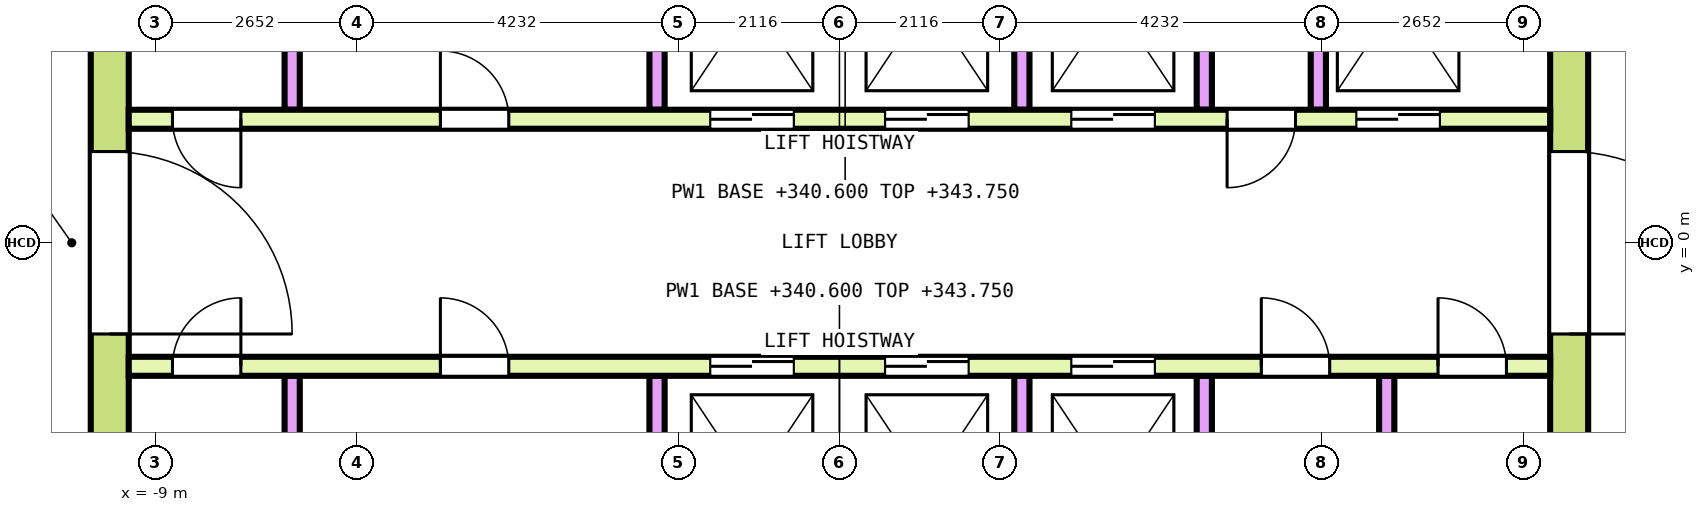
"""IFC4 building model, lengths in metres.
Left out: names, types, materials, properties, quantities, classifications, styles, units other than length and angle.
Written with IfcOpenShell. Run it as: python <this file> out.ifc"""

import sys

from ifc_helpers import new_model, si_unit, direction, frame, frame_2d, origin, place, context, subcontext, project, spatial, rectangle, extrude, element, fill, save


model = new_model("IFC4")
c1 = context("Model", 3, precision=1e-05, world=origin(), true_north=direction((0.0, 1.0)))
c2 = subcontext(c1, "Body", "Model", "MODEL_VIEW")
j1 = project(units=[si_unit("LENGTHUNIT", "METRE"), si_unit("PLANEANGLEUNIT", "RADIAN")], contexts=[c1])
p1 = place(None, origin())
s1 = spatial("IfcSite", under=j1, at=p1, CompositionType="ELEMENT")
p2 = place(p1, origin())
s2 = spatial("IfcBuilding", under=s1, at=p2, CompositionType="ELEMENT")
p3 = place(p2, frame((0.0, 0.0, 340.6)))
s3 = spatial("IfcBuildingStorey", under=s2, at=p3, CompositionType="ELEMENT", Elevation=340.6)
p4 = place(p3, frame((-9.6, -7.85, 0.0), z_axis=(0.0, 0.0, 1.0), x_axis=(0.0, 1.0, 0.0)))
e1 = element("IfcWall", 1, at=p4, inside=s3, PredefinedType="SHEAR", context=c2, shape_type="SweptSolid", body=[
    extrude(rectangle(XDim=15.7, YDim=0.5, at=frame_2d((7.85, 0.0))), origin(), (0.0, 0.0, 1.0), 3.8),
])
p5 = place(p4, frame((6.65, 0.0, 0.0)))
e2 = element("IfcOpeningElement", 2, at=p5, cuts=e1, PredefinedType="OPENING", context=c2, shape_type="SweptSolid", body=[
    extrude(rectangle(XDim=2.4, YDim=2.1, at=frame_2d((1.2, 1.05))), frame((0.0, 0.26, 0.0), z_axis=(0.0, -1.0, 0.0), x_axis=(1.0, 0.0, 0.0)), (0.0, 0.0, 1.0), 0.52),
])
p6 = place(p4, frame((13.55, 0.0, 0.0)))
e3 = element("IfcOpeningElement", 3, at=p6, cuts=e1, PredefinedType="OPENING", context=c2, shape_type="SweptSolid", body=[
    extrude(rectangle(XDim=1.2, YDim=2.1, at=frame_2d((0.6, 1.05))), frame((0.0, 0.26, 0.0), z_axis=(0.0, -1.0, 0.0), x_axis=(1.0, 0.0, 0.0)), (0.0, 0.0, 1.0), 0.52),
])
p7 = place(p4, frame((0.95, 0.0, 0.0)))
e4 = element("IfcOpeningElement", 4, at=p7, cuts=e1, PredefinedType="OPENING", context=c2, shape_type="SweptSolid", body=[
    extrude(rectangle(XDim=1.2, YDim=2.1, at=frame_2d((0.6, 1.05))), frame((0.0, 0.26, 0.0), z_axis=(0.0, -1.0, 0.0), x_axis=(1.0, 0.0, 0.0)), (0.0, 0.0, 1.0), 0.52),
])
p8 = place(p3, frame((9.6, -7.85, 0.0), z_axis=(0.0, 0.0, 1.0), x_axis=(0.0, 1.0, 0.0)))
e5 = element("IfcWall", 5, at=p8, inside=s3, PredefinedType="SHEAR", context=c2, shape_type="SweptSolid", body=[
    extrude(rectangle(XDim=15.7, YDim=0.5, at=frame_2d((7.85, 0.0))), origin(), (0.0, 0.0, 1.0), 3.8),
])
p9 = place(p8, frame((6.65, 0.0, 0.0)))
e6 = element("IfcOpeningElement", 6, at=p9, cuts=e5, PredefinedType="OPENING", context=c2, shape_type="SweptSolid", body=[
    extrude(rectangle(XDim=2.4, YDim=2.1, at=frame_2d((1.2, 1.05))), frame((0.0, 0.26, 0.0), z_axis=(0.0, -1.0, 0.0), x_axis=(1.0, 0.0, 0.0)), (0.0, 0.0, 1.0), 0.52),
])
p10 = place(p8, frame((13.55, 0.0, 0.0)))
e7 = element("IfcOpeningElement", 7, at=p10, cuts=e5, PredefinedType="OPENING", context=c2, shape_type="SweptSolid", body=[
    extrude(rectangle(XDim=1.2, YDim=2.1, at=frame_2d((0.6, 1.05))), frame((0.0, 0.26, 0.0), z_axis=(0.0, -1.0, 0.0), x_axis=(1.0, 0.0, 0.0)), (0.0, 0.0, 1.0), 0.52),
])
p11 = place(p8, frame((1.05, 0.0, 0.0)))
e8 = element("IfcOpeningElement", 8, at=p11, cuts=e5, PredefinedType="OPENING", context=c2, shape_type="SweptSolid", body=[
    extrude(rectangle(XDim=1.0, YDim=2.1, at=frame_2d((0.5, 1.05))), frame((0.0, 0.26, 0.0), z_axis=(0.0, -1.0, 0.0), x_axis=(1.0, 0.0, 0.0)), (0.0, 0.0, 1.0), 0.52),
])
p12 = place(p3, frame((-9.35, 1.625, 0.0), z_axis=(0.0, 0.0, 1.0), x_axis=(1.0, 0.0, 0.0)))
e9 = element("IfcWall", 9, at=p12, inside=s3, PredefinedType="SOLIDWALL", context=c2, shape_type="SweptSolid", body=[
    extrude(rectangle(XDim=18.7, YDim=0.25, at=frame_2d((9.35, 0.0))), origin(), (0.0, 0.0, 1.0), 3.8),
])
p13 = place(p12, frame((7.65, 0.0, 0.0)))
e10 = element("IfcOpeningElement", 10, at=p13, cuts=e9, PredefinedType="OPENING", context=c2, shape_type="SweptSolid", body=[
    extrude(rectangle(XDim=1.1, YDim=2.1, at=frame_2d((0.55, 1.05))), frame((0.0, 0.135, 0.0), z_axis=(0.0, -1.0, 0.0), x_axis=(1.0, 0.0, 0.0)), (0.0, 0.0, 1.0), 0.27),
])
p14 = place(p12, frame((9.95, 0.0, 0.0)))
e11 = element("IfcOpeningElement", 11, at=p14, cuts=e9, PredefinedType="OPENING", context=c2, shape_type="SweptSolid", body=[
    extrude(rectangle(XDim=1.1, YDim=2.1, at=frame_2d((0.55, 1.05))), frame((0.0, 0.135, 0.0), z_axis=(0.0, -1.0, 0.0), x_axis=(1.0, 0.0, 0.0)), (0.0, 0.0, 1.0), 0.27),
])
p15 = place(p12, frame((12.4, 0.0, 0.0)))
e12 = element("IfcOpeningElement", 12, at=p15, cuts=e9, PredefinedType="OPENING", context=c2, shape_type="SweptSolid", body=[
    extrude(rectangle(XDim=1.1, YDim=2.1, at=frame_2d((0.55, 1.05))), frame((0.0, 0.135, 0.0), z_axis=(0.0, -1.0, 0.0), x_axis=(1.0, 0.0, 0.0)), (0.0, 0.0, 1.0), 0.27),
])
p16 = place(p12, frame((16.15, 0.0, 0.0)))
e13 = element("IfcOpeningElement", 13, at=p16, cuts=e9, PredefinedType="OPENING", context=c2, shape_type="SweptSolid", body=[
    extrude(rectangle(XDim=1.1, YDim=2.1, at=frame_2d((0.55, 1.05))), frame((0.0, 0.135, 0.0), z_axis=(0.0, -1.0, 0.0), x_axis=(1.0, 0.0, 0.0)), (0.0, 0.0, 1.0), 0.27),
])
p17 = place(p12, frame((0.575, 0.0, 0.0)))
e14 = element("IfcOpeningElement", 14, at=p17, cuts=e9, PredefinedType="OPENING", context=c2, shape_type="SweptSolid", body=[
    extrude(rectangle(XDim=0.9, YDim=2.1, at=frame_2d((0.45, 1.05))), frame((0.0, 0.135, 0.0), z_axis=(0.0, -1.0, 0.0), x_axis=(1.0, 0.0, 0.0)), (0.0, 0.0, 1.0), 0.27),
])
p18 = place(p12, frame((4.1, 0.0, 0.0)))
e15 = element("IfcOpeningElement", 15, at=p18, cuts=e9, PredefinedType="OPENING", context=c2, shape_type="SweptSolid", body=[
    extrude(rectangle(XDim=0.9, YDim=2.1, at=frame_2d((0.45, 1.05))), frame((0.0, 0.135, 0.0), z_axis=(0.0, -1.0, 0.0), x_axis=(1.0, 0.0, 0.0)), (0.0, 0.0, 1.0), 0.27),
])
p19 = place(p12, frame((14.45, 0.0, 0.0)))
e16 = element("IfcOpeningElement", 16, at=p19, cuts=e9, PredefinedType="OPENING", context=c2, shape_type="SweptSolid", body=[
    extrude(rectangle(XDim=0.9, YDim=2.1, at=frame_2d((0.45, 1.05))), frame((0.0, 0.135, 0.0), z_axis=(0.0, -1.0, 0.0), x_axis=(1.0, 0.0, 0.0)), (0.0, 0.0, 1.0), 0.27),
])
for number, where, z_axis, x_axis in (
    (17, (-7.2, 1.75, 0.0), (0.0, 0.0, 1.0), (0.0, 1.0, 0.0)),
    (18, (-2.4, 1.75, 0.0), (0.0, 0.0, 1.0), (0.0, 1.0, 0.0)),
    (19, (2.4, 1.75, 0.0), (0.0, 0.0, 1.0), (0.0, 1.0, 0.0)),
    (20, (4.8, 1.75, 0.0), (0.0, 0.0, 1.0), (0.0, 1.0, 0.0)),
    (21, (6.3, 1.75, 0.0), (0.0, 0.0, 1.0), (0.0, 1.0, 0.0)),
):
    element("IfcWall", number, at=place(p3, frame(where, z_axis=z_axis, x_axis=x_axis)), inside=s3, PredefinedType="SOLIDWALL", context=c2, shape_type="SweptSolid", body=[
        extrude(rectangle(XDim=2.9, YDim=0.2, at=frame_2d((1.45, 0.0))), origin(), (0.0, 0.0, 1.0), 3.8),
    ])
p20 = place(p3, frame((-9.35, -1.625, 0.0), z_axis=(0.0, 0.0, 1.0), x_axis=(1.0, 0.0, 0.0)))
e22 = element("IfcWall", 22, at=p20, inside=s3, PredefinedType="SOLIDWALL", context=c2, shape_type="SweptSolid", body=[
    extrude(rectangle(XDim=18.7, YDim=0.25, at=frame_2d((9.35, 0.0))), origin(), (0.0, 0.0, 1.0), 3.8),
])
p21 = place(p20, frame((7.65, 0.0, 0.0)))
e23 = element("IfcOpeningElement", 23, at=p21, cuts=e22, PredefinedType="OPENING", context=c2, shape_type="SweptSolid", body=[
    extrude(rectangle(XDim=1.1, YDim=2.1, at=frame_2d((0.55, 1.05))), frame((0.0, 0.135, 0.0), z_axis=(0.0, -1.0, 0.0), x_axis=(1.0, 0.0, 0.0)), (0.0, 0.0, 1.0), 0.27),
])
p22 = place(p20, frame((9.95, 0.0, 0.0)))
e24 = element("IfcOpeningElement", 24, at=p22, cuts=e22, PredefinedType="OPENING", context=c2, shape_type="SweptSolid", body=[
    extrude(rectangle(XDim=1.1, YDim=2.1, at=frame_2d((0.55, 1.05))), frame((0.0, 0.135, 0.0), z_axis=(0.0, -1.0, 0.0), x_axis=(1.0, 0.0, 0.0)), (0.0, 0.0, 1.0), 0.27),
])
p23 = place(p20, frame((12.4, 0.0, 0.0)))
e25 = element("IfcOpeningElement", 25, at=p23, cuts=e22, PredefinedType="OPENING", context=c2, shape_type="SweptSolid", body=[
    extrude(rectangle(XDim=1.1, YDim=2.1, at=frame_2d((0.55, 1.05))), frame((0.0, 0.135, 0.0), z_axis=(0.0, -1.0, 0.0), x_axis=(1.0, 0.0, 0.0)), (0.0, 0.0, 1.0), 0.27),
])
p24 = place(p20, frame((0.575, 0.0, 0.0)))
e26 = element("IfcOpeningElement", 26, at=p24, cuts=e22, PredefinedType="OPENING", context=c2, shape_type="SweptSolid", body=[
    extrude(rectangle(XDim=0.9, YDim=2.1, at=frame_2d((0.45, 1.05))), frame((0.0, 0.135, 0.0), z_axis=(0.0, -1.0, 0.0), x_axis=(1.0, 0.0, 0.0)), (0.0, 0.0, 1.0), 0.27),
])
p25 = place(p20, frame((4.1, 0.0, 0.0)))
e27 = element("IfcOpeningElement", 27, at=p25, cuts=e22, PredefinedType="OPENING", context=c2, shape_type="SweptSolid", body=[
    extrude(rectangle(XDim=0.9, YDim=2.1, at=frame_2d((0.45, 1.05))), frame((0.0, 0.135, 0.0), z_axis=(0.0, -1.0, 0.0), x_axis=(1.0, 0.0, 0.0)), (0.0, 0.0, 1.0), 0.27),
])
p26 = place(p20, frame((14.9, 0.0, 0.0)))
e28 = element("IfcOpeningElement", 28, at=p26, cuts=e22, PredefinedType="OPENING", context=c2, shape_type="SweptSolid", body=[
    extrude(rectangle(XDim=0.9, YDim=2.1, at=frame_2d((0.45, 1.05))), frame((0.0, 0.135, 0.0), z_axis=(0.0, -1.0, 0.0), x_axis=(1.0, 0.0, 0.0)), (0.0, 0.0, 1.0), 0.27),
])
p27 = place(p20, frame((17.225, 0.0, 0.0)))
e29 = element("IfcOpeningElement", 29, at=p27, cuts=e22, PredefinedType="OPENING", context=c2, shape_type="SweptSolid", body=[
    extrude(rectangle(XDim=0.9, YDim=2.1, at=frame_2d((0.45, 1.05))), frame((0.0, 0.135, 0.0), z_axis=(0.0, -1.0, 0.0), x_axis=(1.0, 0.0, 0.0)), (0.0, 0.0, 1.0), 0.27),
])
for number, where, z_axis, x_axis in (
    (30, (-7.2, -4.65, 0.0), (0.0, 0.0, 1.0), (0.0, 1.0, 0.0)),
    (31, (-2.4, -4.65, 0.0), (0.0, 0.0, 1.0), (0.0, 1.0, 0.0)),
    (32, (2.4, -4.65, 0.0), (0.0, 0.0, 1.0), (0.0, 1.0, 0.0)),
    (33, (4.8, -4.65, 0.0), (0.0, 0.0, 1.0), (0.0, 1.0, 0.0)),
    (34, (7.2, -4.65, 0.0), (0.0, 0.0, 1.0), (0.0, 1.0, 0.0)),
):
    element("IfcWall", number, at=place(p3, frame(where, z_axis=z_axis, x_axis=x_axis)), inside=s3, PredefinedType="SOLIDWALL", context=c2, shape_type="SweptSolid", body=[
        extrude(rectangle(XDim=2.9, YDim=0.2, at=frame_2d((1.45, 0.0))), origin(), (0.0, 0.0, 1.0), 3.8),
    ])
p28 = place(p13, origin())
e35 = element("IfcDoor", 35, at=p28, inside=s3, OperationType="DOUBLE_DOOR_SLIDING", PredefinedType="DOOR", context=c2, shape_type="SweptSolid", body=[
    extrude(rectangle(XDim=1.1, YDim=2.1, at=frame_2d((0.55, 1.05))), frame((0.0, 0.075, 0.0), z_axis=(0.0, -1.0, 0.0), x_axis=(1.0, 0.0, 0.0)), (0.0, 0.0, 1.0), 0.15),
])
fill(e10, e35)
p29 = place(p14, origin())
e36 = element("IfcDoor", 36, at=p29, inside=s3, OperationType="DOUBLE_DOOR_SLIDING", PredefinedType="DOOR", context=c2, shape_type="SweptSolid", body=[
    extrude(rectangle(XDim=1.1, YDim=2.1, at=frame_2d((0.55, 1.05))), frame((0.0, 0.075, 0.0), z_axis=(0.0, -1.0, 0.0), x_axis=(1.0, 0.0, 0.0)), (0.0, 0.0, 1.0), 0.15),
])
fill(e11, e36)
p30 = place(p15, origin())
e37 = element("IfcDoor", 37, at=p30, inside=s3, OperationType="DOUBLE_DOOR_SLIDING", PredefinedType="DOOR", context=c2, shape_type="SweptSolid", body=[
    extrude(rectangle(XDim=1.1, YDim=2.1, at=frame_2d((0.55, 1.05))), frame((0.0, 0.075, 0.0), z_axis=(0.0, -1.0, 0.0), x_axis=(1.0, 0.0, 0.0)), (0.0, 0.0, 1.0), 0.15),
])
fill(e12, e37)
p31 = place(p16, origin())
e38 = element("IfcDoor", 38, at=p31, inside=s3, OperationType="DOUBLE_DOOR_SLIDING", PredefinedType="DOOR", context=c2, shape_type="SweptSolid", body=[
    extrude(rectangle(XDim=1.1, YDim=2.1, at=frame_2d((0.55, 1.05))), frame((0.0, 0.075, 0.0), z_axis=(0.0, -1.0, 0.0), x_axis=(1.0, 0.0, 0.0)), (0.0, 0.0, 1.0), 0.15),
])
fill(e13, e38)
p32 = place(p21, origin())
e39 = element("IfcDoor", 39, at=p32, inside=s3, OperationType="DOUBLE_DOOR_SLIDING", PredefinedType="DOOR", context=c2, shape_type="SweptSolid", body=[
    extrude(rectangle(XDim=1.1, YDim=2.1, at=frame_2d((0.55, 1.05))), frame((0.0, 0.075, 0.0), z_axis=(0.0, -1.0, 0.0), x_axis=(1.0, 0.0, 0.0)), (0.0, 0.0, 1.0), 0.15),
])
fill(e23, e39)
p33 = place(p22, origin())
e40 = element("IfcDoor", 40, at=p33, inside=s3, OperationType="DOUBLE_DOOR_SLIDING", PredefinedType="DOOR", context=c2, shape_type="SweptSolid", body=[
    extrude(rectangle(XDim=1.1, YDim=2.1, at=frame_2d((0.55, 1.05))), frame((0.0, 0.075, 0.0), z_axis=(0.0, -1.0, 0.0), x_axis=(1.0, 0.0, 0.0)), (0.0, 0.0, 1.0), 0.15),
])
fill(e24, e40)
p34 = place(p23, origin())
e41 = element("IfcDoor", 41, at=p34, inside=s3, OperationType="DOUBLE_DOOR_SLIDING", PredefinedType="DOOR", context=c2, shape_type="SweptSolid", body=[
    extrude(rectangle(XDim=1.1, YDim=2.1, at=frame_2d((0.55, 1.05))), frame((0.0, 0.075, 0.0), z_axis=(0.0, -1.0, 0.0), x_axis=(1.0, 0.0, 0.0)), (0.0, 0.0, 1.0), 0.15),
])
fill(e25, e41)
p35 = place(p5, origin())
e42 = element("IfcDoor", 42, at=p35, inside=s3, OperationType="DOUBLE_DOOR_SINGLE_SWING", PredefinedType="DOOR", context=c2, shape_type="SweptSolid", body=[
    extrude(rectangle(XDim=2.4, YDim=2.1, at=frame_2d((1.2, 1.05))), frame((0.0, 0.2, 0.0), z_axis=(0.0, -1.0, 0.0), x_axis=(1.0, 0.0, 0.0)), (0.0, 0.0, 1.0), 0.4),
])
fill(e2, e42)
p36 = place(p9, origin())
e43 = element("IfcDoor", 43, at=p36, inside=s3, OperationType="DOUBLE_DOOR_SINGLE_SWING", PredefinedType="DOOR", context=c2, shape_type="SweptSolid", body=[
    extrude(rectangle(XDim=2.4, YDim=2.1, at=frame_2d((1.2, 1.05))), frame((0.0, 0.2, 0.0), z_axis=(0.0, -1.0, 0.0), x_axis=(1.0, 0.0, 0.0)), (0.0, 0.0, 1.0), 0.4),
])
fill(e6, e43)
p37 = place(p17, origin())
e44 = element("IfcDoor", 44, at=p37, inside=s3, OperationType="SINGLE_SWING_RIGHT", PredefinedType="DOOR", context=c2, shape_type="SweptSolid", body=[
    extrude(rectangle(XDim=0.9, YDim=2.1, at=frame_2d((0.45, 1.05))), frame((0.0, 0.075, 0.0), z_axis=(0.0, -1.0, 0.0), x_axis=(1.0, 0.0, 0.0)), (0.0, 0.0, 1.0), 0.15),
])
fill(e14, e44)
p38 = place(p18, origin())
e45 = element("IfcDoor", 45, at=p38, inside=s3, OperationType="SINGLE_SWING_LEFT", PredefinedType="DOOR", context=c2, shape_type="SweptSolid", body=[
    extrude(rectangle(XDim=0.9, YDim=2.1, at=frame_2d((0.45, 1.05))), frame((0.0, 0.075, 0.0), z_axis=(0.0, -1.0, 0.0), x_axis=(1.0, 0.0, 0.0)), (0.0, 0.0, 1.0), 0.15),
])
fill(e15, e45)
p39 = place(p19, origin())
e46 = element("IfcDoor", 46, at=p39, inside=s3, OperationType="SINGLE_SWING_RIGHT", PredefinedType="DOOR", context=c2, shape_type="SweptSolid", body=[
    extrude(rectangle(XDim=0.9, YDim=2.1, at=frame_2d((0.45, 1.05))), frame((0.0, 0.075, 0.0), z_axis=(0.0, -1.0, 0.0), x_axis=(1.0, 0.0, 0.0)), (0.0, 0.0, 1.0), 0.15),
])
fill(e16, e46)
p40 = place(p24, origin())
e47 = element("IfcDoor", 47, at=p40, inside=s3, OperationType="SINGLE_SWING_LEFT", PredefinedType="DOOR", context=c2, shape_type="SweptSolid", body=[
    extrude(rectangle(XDim=0.9, YDim=2.1, at=frame_2d((0.45, 1.05))), frame((0.0, 0.075, 0.0), z_axis=(0.0, -1.0, 0.0), x_axis=(1.0, 0.0, 0.0)), (0.0, 0.0, 1.0), 0.15),
])
fill(e26, e47)
p41 = place(p25, origin())
e48 = element("IfcDoor", 48, at=p41, inside=s3, OperationType="SINGLE_SWING_RIGHT", PredefinedType="DOOR", context=c2, shape_type="SweptSolid", body=[
    extrude(rectangle(XDim=0.9, YDim=2.1, at=frame_2d((0.45, 1.05))), frame((0.0, 0.075, 0.0), z_axis=(0.0, -1.0, 0.0), x_axis=(1.0, 0.0, 0.0)), (0.0, 0.0, 1.0), 0.15),
])
fill(e27, e48)
p42 = place(p26, origin())
e49 = element("IfcDoor", 49, at=p42, inside=s3, OperationType="SINGLE_SWING_LEFT", PredefinedType="DOOR", context=c2, shape_type="SweptSolid", body=[
    extrude(rectangle(XDim=0.9, YDim=2.1, at=frame_2d((0.45, 1.05))), frame((0.0, 0.075, 0.0), z_axis=(0.0, -1.0, 0.0), x_axis=(1.0, 0.0, 0.0)), (0.0, 0.0, 1.0), 0.15),
])
fill(e28, e49)
p43 = place(p27, origin())
e50 = element("IfcDoor", 50, at=p43, inside=s3, OperationType="SINGLE_SWING_RIGHT", PredefinedType="DOOR", context=c2, shape_type="SweptSolid", body=[
    extrude(rectangle(XDim=0.9, YDim=2.1, at=frame_2d((0.45, 1.05))), frame((0.0, 0.075, 0.0), z_axis=(0.0, -1.0, 0.0), x_axis=(1.0, 0.0, 0.0)), (0.0, 0.0, 1.0), 0.15),
])
fill(e29, e50)
save(model, sys.argv[1])
